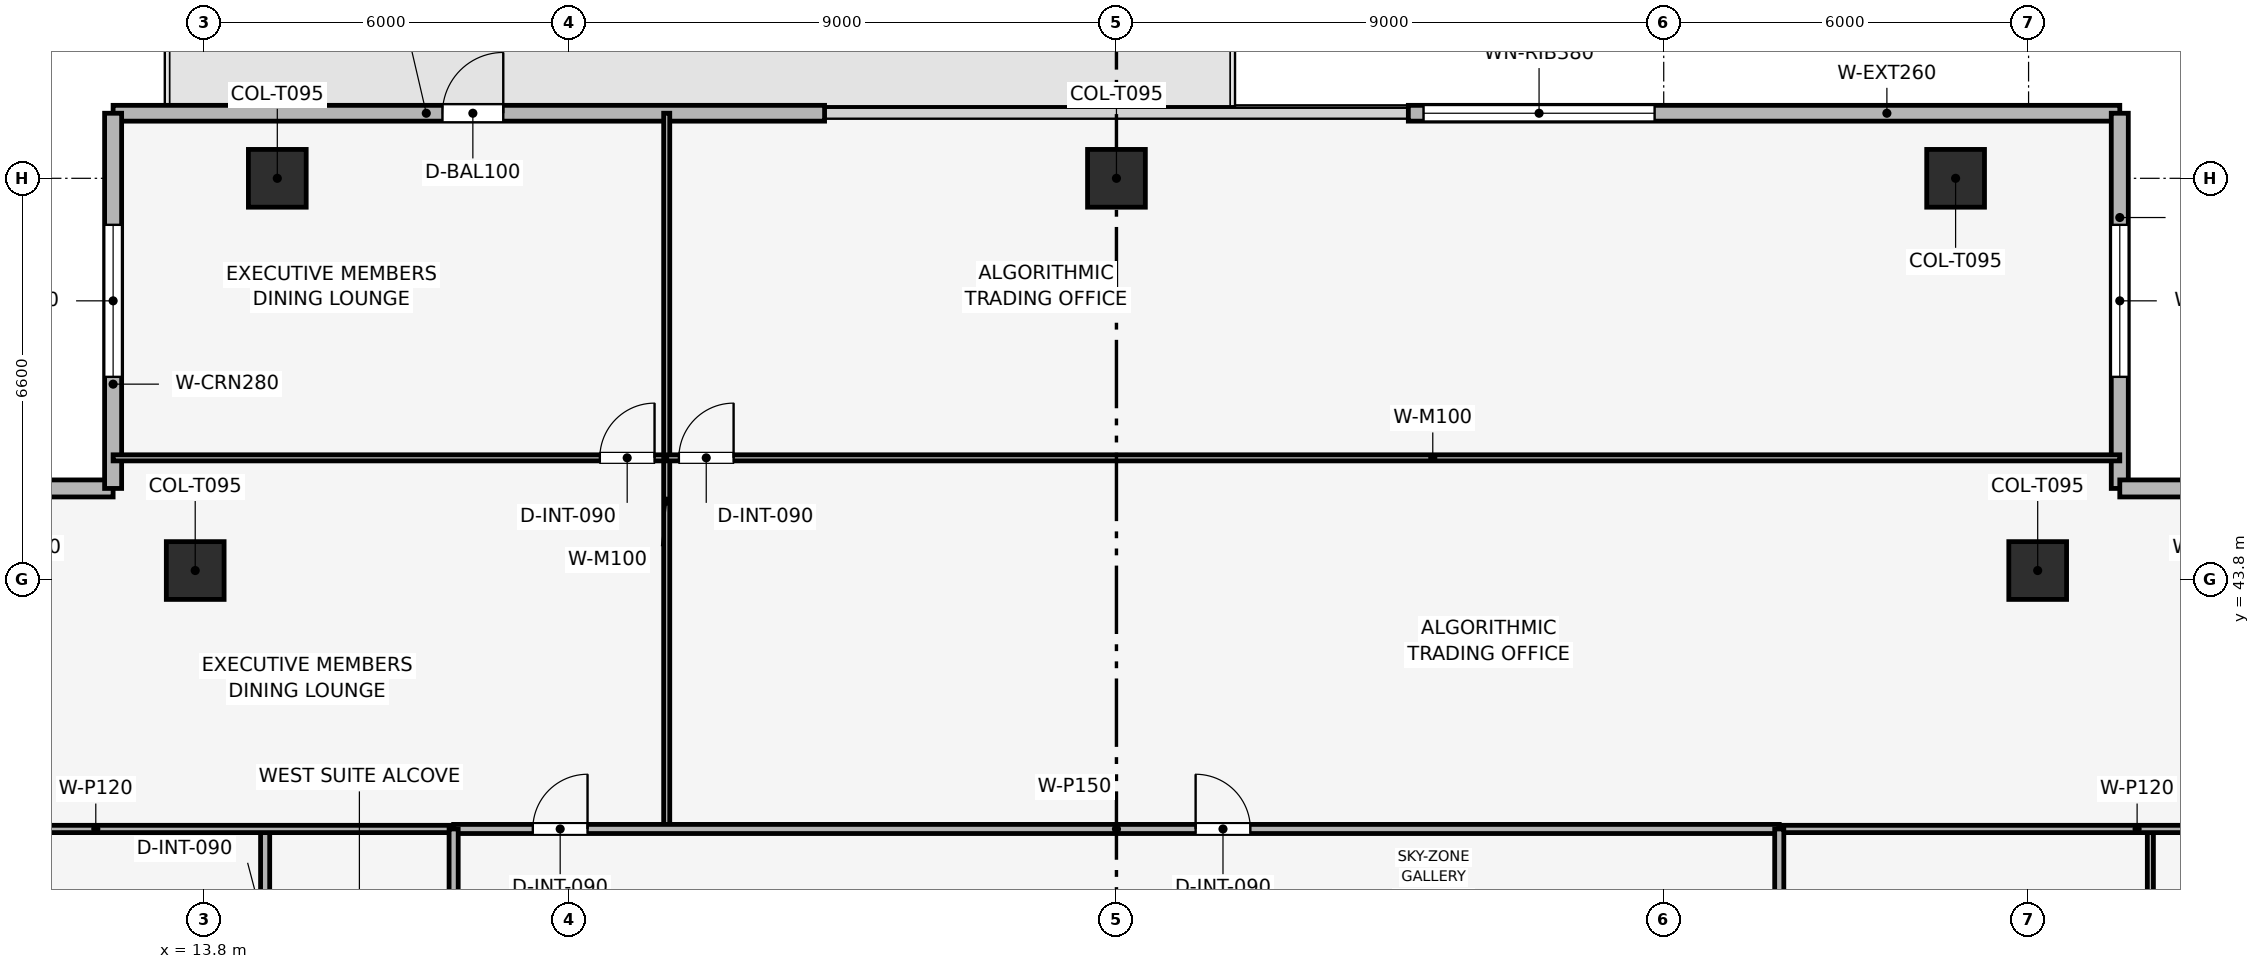
"""IFC4 building model, lengths in metres.
Left out: names, types, materials, properties, quantities, classifications, styles, units other than length and angle.
Written with IfcOpenShell. Run it as: python <this file> out.ifc"""

import sys

from ifc_helpers import new_model, si_unit, direction, frame, frame_2d, origin, origin_2d, place, context, subcontext, project, spatial, rectangle, extrude, element, fill, save


model = new_model("IFC4")
c1 = context("Model", 3, precision=1e-05, world=origin(), true_north=direction((0.0, 1.0)))
c2 = subcontext(c1, "Body", "Model", "MODEL_VIEW")
j1 = project(units=[si_unit("LENGTHUNIT", "METRE"), si_unit("PLANEANGLEUNIT", "RADIAN")], contexts=[c1])
p1 = place(None, origin())
s1 = spatial("IfcSite", under=j1, at=p1, CompositionType="ELEMENT")
p2 = place(p1, origin())
s2 = spatial("IfcBuilding", under=s1, at=p2, CompositionType="ELEMENT")
p3 = place(p2, frame((0.0, 0.0, 306.75)))
s3 = spatial("IfcBuildingStorey", under=s2, at=p3, CompositionType="ELEMENT", Elevation=306.75)
for number, where, z_axis, x_axis in (
    (1, (42.6, 50.4, 0.003), (0.0, 0.0, 1.0), (1.0, 0.0, 0.0)),
    (2, (28.8, 50.4, 0.003), (0.0, 0.0, 1.0), (1.0, 0.0, 0.0)),
    (3, (15.0, 50.4, 0.003), (0.0, 0.0, 1.0), (1.0, 0.0, 0.0)),
    (4, (43.95, 43.95, 0.003), (0.0, 0.0, 1.0), (1.0, 0.0, 0.0)),
    (5, (13.65, 43.95, 0.003), (0.0, 0.0, 1.0), (1.0, 0.0, 0.0)),
):
    element("IfcColumn", number, at=place(p3, frame(where, z_axis=z_axis, x_axis=x_axis)), inside=s3, PredefinedType="COLUMN", context=c2, shape_type="SweptSolid", body=[
        extrude(rectangle(XDim=0.95, YDim=0.95, at=origin_2d()), origin(), (0.0, 0.0, 1.0), 3.504),
    ])
p4 = place(p3, frame((12.3, 51.47, 0.0), z_axis=(0.0, 0.0, 1.0), x_axis=(1.0, 0.0, 0.0)))
e6 = element("IfcWall", 6, at=p4, inside=s3, PredefinedType="SOLIDWALL", context=c2, shape_type="SweptSolid", body=[
    extrude(rectangle(XDim=11.7, YDim=0.26, at=frame_2d((5.85, 0.0))), origin(), (0.0, 0.0, 1.0), 3.51),
])
p5 = place(p4, frame((5.416, 0.0, 0.0)))
e7 = element("IfcOpeningElement", 7, at=p5, cuts=e6, PredefinedType="OPENING", context=c2, shape_type="SweptSolid", body=[
    extrude(rectangle(XDim=1.0, YDim=2.2, at=frame_2d((0.5, 1.1))), frame((0.0, 0.14, 0.0), z_axis=(0.0, -1.0, 0.0), x_axis=(1.0, 0.0, 0.0)), (0.0, 0.0, 1.0), 0.28),
])
p6 = place(p3, frame((33.6, 51.47, 0.0), z_axis=(0.0, 0.0, 1.0), x_axis=(1.0, 0.0, 0.0)))
e8 = element("IfcWall", 8, at=p6, inside=s3, PredefinedType="SOLIDWALL", context=c2, shape_type="SweptSolid", body=[
    extrude(rectangle(XDim=11.7, YDim=0.26, at=frame_2d((5.85, 0.0))), origin(), (0.0, 0.0, 1.0), 3.51),
])
p7 = place(p6, frame((0.25, 0.0, 0.9)))
e9 = element("IfcOpeningElement", 9, at=p7, cuts=e8, PredefinedType="OPENING", context=c2, shape_type="SweptSolid", body=[
    extrude(rectangle(XDim=3.8, YDim=1.9, at=frame_2d((1.9, 0.95))), frame((0.0, 0.14, 0.0), z_axis=(0.0, -1.0, 0.0), x_axis=(1.0, 0.0, 0.0)), (0.0, 0.0, 1.0), 0.28),
])
p8 = place(p3, frame((6.13, 45.3, 0.0), z_axis=(0.0, 0.0, 1.0), x_axis=(1.0, 0.0, 0.0)))
e10 = element("IfcWall", 10, at=p8, inside=s3, PredefinedType="SOLIDWALL", context=c2, shape_type="SweptSolid", body=[
    extrude(rectangle(XDim=6.17, YDim=0.28, at=frame_2d((3.085, 0.0))), origin(), (0.0, 0.0, 1.0), 3.51),
])
p9 = place(p8, frame((1.835, 0.0, 0.9)))
e11 = element("IfcOpeningElement", 11, at=p9, cuts=e10, PredefinedType="OPENING", context=c2, shape_type="SweptSolid", body=[
    extrude(rectangle(XDim=2.5, YDim=1.9, at=frame_2d((1.25, 0.95))), frame((0.0, 0.15, 0.0), z_axis=(0.0, -1.0, 0.0), x_axis=(1.0, 0.0, 0.0)), (0.0, 0.0, 1.0), 0.3),
])
p10 = place(p3, frame((12.3, 45.3, 0.0), z_axis=(0.0, 0.0, 1.0), x_axis=(0.0, 1.0, 0.0)))
e12 = element("IfcWall", 12, at=p10, inside=s3, PredefinedType="SOLIDWALL", context=c2, shape_type="SweptSolid", body=[
    extrude(rectangle(XDim=6.17, YDim=0.28, at=frame_2d((3.085, 0.0))), origin(), (0.0, 0.0, 1.0), 3.51),
])
p11 = place(p10, frame((1.835, 0.0, 0.9)))
e13 = element("IfcOpeningElement", 13, at=p11, cuts=e12, PredefinedType="OPENING", context=c2, shape_type="SweptSolid", body=[
    extrude(rectangle(XDim=2.5, YDim=1.9, at=frame_2d((1.25, 0.95))), frame((0.0, 0.15, 0.0), z_axis=(0.0, -1.0, 0.0), x_axis=(1.0, 0.0, 0.0)), (0.0, 0.0, 1.0), 0.3),
])
p12 = place(p3, frame((45.3, 51.47, 0.0), z_axis=(0.0, 0.0, 1.0), x_axis=(0.0, -1.0, 0.0)))
e14 = element("IfcWall", 14, at=p12, inside=s3, PredefinedType="SOLIDWALL", context=c2, shape_type="SweptSolid", body=[
    extrude(rectangle(XDim=6.17, YDim=0.28, at=frame_2d((3.085, 0.0))), origin(), (0.0, 0.0, 1.0), 3.51),
])
p13 = place(p12, frame((1.835, 0.0, 0.9)))
e15 = element("IfcOpeningElement", 15, at=p13, cuts=e14, PredefinedType="OPENING", context=c2, shape_type="SweptSolid", body=[
    extrude(rectangle(XDim=2.5, YDim=1.9, at=frame_2d((1.25, 0.95))), frame((0.0, 0.15, 0.0), z_axis=(0.0, -1.0, 0.0), x_axis=(1.0, 0.0, 0.0)), (0.0, 0.0, 1.0), 0.3),
])
p14 = place(p3, frame((45.3, 45.3, 0.0), z_axis=(0.0, 0.0, 1.0), x_axis=(1.0, 0.0, 0.0)))
e16 = element("IfcWall", 16, at=p14, inside=s3, PredefinedType="SOLIDWALL", context=c2, shape_type="SweptSolid", body=[
    extrude(rectangle(XDim=6.17, YDim=0.28, at=frame_2d((3.085, 0.0))), origin(), (0.0, 0.0, 1.0), 3.51),
])
p15 = place(p14, frame((1.835, 0.0, 0.9)))
e17 = element("IfcOpeningElement", 17, at=p15, cuts=e16, PredefinedType="OPENING", context=c2, shape_type="SweptSolid", body=[
    extrude(rectangle(XDim=2.5, YDim=1.9, at=frame_2d((1.25, 0.95))), frame((0.0, 0.15, 0.0), z_axis=(0.0, -1.0, 0.0), x_axis=(1.0, 0.0, 0.0)), (0.0, 0.0, 1.0), 0.3),
])
p16 = place(p3, frame((12.3, 45.803, 0.0), z_axis=(0.0, 0.0, 1.0), x_axis=(1.0, 0.0, 0.0)))
e18 = element("IfcWall", 18, at=p16, inside=s3, PredefinedType="MOVABLE", context=c2, shape_type="SweptSolid", body=[
    extrude(rectangle(XDim=9.104, YDim=0.1, at=frame_2d((4.552, 0.0))), origin(), (0.0, 0.0, 1.0), 3.095),
])
p17 = place(p16, frame((8.004, 0.0, 0.0)))
e19 = element("IfcOpeningElement", 19, at=p17, cuts=e18, PredefinedType="OPENING", context=c2, shape_type="SweptSolid", body=[
    extrude(rectangle(XDim=0.9, YDim=2.1, at=frame_2d((0.45, 1.05))), frame((0.0, 0.06, 0.0), z_axis=(0.0, -1.0, 0.0), x_axis=(1.0, 0.0, 0.0)), (0.0, 0.0, 1.0), 0.12),
])
p18 = place(p3, frame((21.404, 39.7, 0.0), z_axis=(0.0, 0.0, 1.0), x_axis=(0.0, 1.0, 0.0)))
e20 = element("IfcWall", 20, at=p18, inside=s3, PredefinedType="MOVABLE", context=c2, shape_type="SweptSolid", body=[
    extrude(rectangle(XDim=11.77, YDim=0.1, at=frame_2d((5.885, 0.0))), origin(), (0.0, 0.0, 1.0), 3.135),
])
p19 = place(p3, frame((21.404, 45.803, 0.0), z_axis=(0.0, 0.0, 1.0), x_axis=(1.0, 0.0, 0.0)))
e21 = element("IfcWall", 21, at=p19, inside=s3, PredefinedType="MOVABLE", context=c2, shape_type="SweptSolid", body=[
    extrude(rectangle(XDim=23.896, YDim=0.1, at=frame_2d((11.948, 0.0))), origin(), (0.0, 0.0, 1.0), 3.095),
])
p20 = place(p19, frame((0.2, 0.0, 0.0)))
e22 = element("IfcOpeningElement", 22, at=p20, cuts=e21, PredefinedType="OPENING", context=c2, shape_type="SweptSolid", body=[
    extrude(rectangle(XDim=0.9, YDim=2.1, at=frame_2d((0.45, 1.05))), frame((0.0, 0.06, 0.0), z_axis=(0.0, -1.0, 0.0), x_axis=(1.0, 0.0, 0.0)), (0.0, 0.0, 1.0), 0.12),
])
p21 = place(p3, frame((14.8, 28.0, 0.0), z_axis=(0.0, 0.0, 1.0), x_axis=(0.0, 1.0, 0.0)))
e23 = element("IfcWall", 23, at=p21, inside=s3, PredefinedType="PARTITIONING", context=c2, shape_type="SweptSolid", body=[
    extrude(rectangle(XDim=11.7, YDim=0.15, at=frame_2d((5.85, 0.0))), origin(), (0.0, 0.0, 1.0), 3.095),
])
p22 = place(p21, frame((9.6, 0.0, 0.0)))
e24 = element("IfcOpeningElement", 24, at=p22, cuts=e23, PredefinedType="OPENING", context=c2, shape_type="SweptSolid", body=[
    extrude(rectangle(XDim=0.9, YDim=2.1, at=frame_2d((0.45, 1.05))), frame((0.0, 0.085, 0.0), z_axis=(0.0, -1.0, 0.0), x_axis=(1.0, 0.0, 0.0)), (0.0, 0.0, 1.0), 0.17),
])
p23 = place(p3, frame((45.803, 29.428, 0.0), z_axis=(0.0, 0.0, 1.0), x_axis=(0.0, 1.0, 0.0)))
e25 = element("IfcWall", 25, at=p23, inside=s3, PredefinedType="MOVABLE", context=c2, shape_type="SweptSolid", body=[
    extrude(rectangle(XDim=10.272, YDim=0.1, at=frame_2d((5.136, 0.0))), origin(), (0.0, 0.0, 1.0), 3.095),
])
p24 = place(p23, frame((5.808, 0.0, 0.0)))
e26 = element("IfcOpeningElement", 26, at=p24, cuts=e25, PredefinedType="OPENING", context=c2, shape_type="SweptSolid", body=[
    extrude(rectangle(XDim=0.9, YDim=2.1, at=frame_2d((0.45, 1.05))), frame((0.0, 0.06, 0.0), z_axis=(0.0, -1.0, 0.0), x_axis=(1.0, 0.0, 0.0)), (0.0, 0.0, 1.0), 0.12),
])
for number, where, z_axis, x_axis in (
    (27, (6.13, 39.7, 0.0), (0.0, 0.0, 1.0), (1.0, 0.0, 0.0)),
    (28, (39.7, 39.7, 0.0), (0.0, 0.0, 1.0), (1.0, 0.0, 0.0)),
):
    element("IfcWall", number, at=place(p3, frame(where, z_axis=z_axis, x_axis=x_axis)), inside=s3, PredefinedType="PARTITIONING", context=c2, shape_type="SweptSolid", body=[
        extrude(rectangle(XDim=11.77, YDim=0.12, at=frame_2d((5.885, 0.0))), origin(), (0.0, 0.0, 1.0), 3.095),
    ])
p25 = place(p3, frame((17.9, 39.7, 0.0), z_axis=(0.0, 0.0, 1.0), x_axis=(1.0, 0.0, 0.0)))
e29 = element("IfcWall", 29, at=p25, inside=s3, PredefinedType="PARTITIONING", context=c2, shape_type="SweptSolid", body=[
    extrude(rectangle(XDim=21.8, YDim=0.15, at=frame_2d((10.9, 0.0))), origin(), (0.0, 0.0, 1.0), 3.095),
])
p26 = place(p25, frame((1.302, 0.0, 0.0)))
e30 = element("IfcOpeningElement", 30, at=p26, cuts=e29, PredefinedType="OPENING", context=c2, shape_type="SweptSolid", body=[
    extrude(rectangle(XDim=0.9, YDim=2.1, at=frame_2d((0.45, 1.05))), frame((0.0, 0.085, 0.0), z_axis=(0.0, -1.0, 0.0), x_axis=(1.0, 0.0, 0.0)), (0.0, 0.0, 1.0), 0.17),
])
p27 = place(p25, frame((12.202, 0.0, 0.0)))
e31 = element("IfcOpeningElement", 31, at=p27, cuts=e29, PredefinedType="OPENING", context=c2, shape_type="SweptSolid", body=[
    extrude(rectangle(XDim=0.9, YDim=2.1, at=frame_2d((0.45, 1.05))), frame((0.0, 0.085, 0.0), z_axis=(0.0, -1.0, 0.0), x_axis=(1.0, 0.0, 0.0)), (0.0, 0.0, 1.0), 0.17),
])
p28 = place(p3, frame((17.9, 12.3, 0.0), z_axis=(0.0, 0.0, 1.0), x_axis=(0.0, 1.0, 0.0)))
e32 = element("IfcWall", 32, at=p28, inside=s3, PredefinedType="PARTITIONING", context=c2, shape_type="SweptSolid", body=[
    extrude(rectangle(XDim=27.4, YDim=0.15, at=frame_2d((13.7, 0.0))), origin(), (0.0, 0.0, 1.0), 3.095),
])
p29 = place(p28, frame((0.7, 0.0, 0.0)))
e33 = element("IfcOpeningElement", 33, at=p29, cuts=e32, PredefinedType="OPENING", context=c2, shape_type="SweptSolid", body=[
    extrude(rectangle(XDim=0.9, YDim=2.1, at=frame_2d((0.45, 1.05))), frame((0.0, 0.085, 0.0), z_axis=(0.0, -1.0, 0.0), x_axis=(1.0, 0.0, 0.0)), (0.0, 0.0, 1.0), 0.17),
])
p30 = place(p28, frame((4.534, 0.0, 0.0)))
e34 = element("IfcOpeningElement", 34, at=p30, cuts=e32, PredefinedType="OPENING", context=c2, shape_type="SweptSolid", body=[
    extrude(rectangle(XDim=0.9, YDim=2.1, at=frame_2d((0.45, 1.05))), frame((0.0, 0.085, 0.0), z_axis=(0.0, -1.0, 0.0), x_axis=(1.0, 0.0, 0.0)), (0.0, 0.0, 1.0), 0.17),
])
p31 = place(p28, frame((11.234, 0.0, 0.0)))
e35 = element("IfcOpeningElement", 35, at=p31, cuts=e32, PredefinedType="OPENING", context=c2, shape_type="SweptSolid", body=[
    extrude(rectangle(XDim=0.9, YDim=2.1, at=frame_2d((0.45, 1.05))), frame((0.0, 0.085, 0.0), z_axis=(0.0, -1.0, 0.0), x_axis=(1.0, 0.0, 0.0)), (0.0, 0.0, 1.0), 0.17),
])
p32 = place(p28, frame((16.65, 0.0, 0.0)))
e36 = element("IfcOpeningElement", 36, at=p32, cuts=e32, PredefinedType="OPENING", context=c2, shape_type="SweptSolid", body=[
    extrude(rectangle(XDim=0.9, YDim=2.1, at=frame_2d((0.45, 1.05))), frame((0.0, 0.085, 0.0), z_axis=(0.0, -1.0, 0.0), x_axis=(1.0, 0.0, 0.0)), (0.0, 0.0, 1.0), 0.17),
])
p33 = place(p28, frame((19.55, 0.0, 0.0)))
e37 = element("IfcOpeningElement", 37, at=p33, cuts=e32, PredefinedType="OPENING", context=c2, shape_type="SweptSolid", body=[
    extrude(rectangle(XDim=0.9, YDim=2.1, at=frame_2d((0.45, 1.05))), frame((0.0, 0.085, 0.0), z_axis=(0.0, -1.0, 0.0), x_axis=(1.0, 0.0, 0.0)), (0.0, 0.0, 1.0), 0.17),
])
p34 = place(p28, frame((22.3, 0.0, 0.0)))
e38 = element("IfcOpeningElement", 38, at=p34, cuts=e32, PredefinedType="OPENING", context=c2, shape_type="SweptSolid", body=[
    extrude(rectangle(XDim=0.95, YDim=2.1, at=frame_2d((0.475, 1.05))), frame((0.0, 0.085, 0.0), z_axis=(0.0, -1.0, 0.0), x_axis=(1.0, 0.0, 0.0)), (0.0, 0.0, 1.0), 0.17),
])
p35 = place(p28, frame((25.3, 0.0, 0.0)))
e39 = element("IfcOpeningElement", 39, at=p35, cuts=e32, PredefinedType="OPENING", context=c2, shape_type="SweptSolid", body=[
    extrude(rectangle(XDim=0.9, YDim=2.1, at=frame_2d((0.45, 1.05))), frame((0.0, 0.085, 0.0), z_axis=(0.0, -1.0, 0.0), x_axis=(1.0, 0.0, 0.0)), (0.0, 0.0, 1.0), 0.17),
])
p36 = place(p3, frame((39.7, 24.4, 0.0), z_axis=(0.0, 0.0, 1.0), x_axis=(0.0, 1.0, 0.0)))
e40 = element("IfcWall", 40, at=p36, inside=s3, PredefinedType="PARTITIONING", context=c2, shape_type="SweptSolid", body=[
    extrude(rectangle(XDim=15.3, YDim=0.15, at=frame_2d((7.65, 0.0))), origin(), (0.0, 0.0, 1.0), 3.095),
])
p37 = place(p36, frame((2.064, 0.0, 0.0)))
e41 = element("IfcOpeningElement", 41, at=p37, cuts=e40, PredefinedType="OPENING", context=c2, shape_type="SweptSolid", body=[
    extrude(rectangle(XDim=0.9, YDim=2.1, at=frame_2d((0.45, 1.05))), frame((0.0, 0.085, 0.0), z_axis=(0.0, -1.0, 0.0), x_axis=(1.0, 0.0, 0.0)), (0.0, 0.0, 1.0), 0.17),
])
p38 = place(p36, frame((9.714, 0.0, 0.0)))
e42 = element("IfcOpeningElement", 42, at=p38, cuts=e40, PredefinedType="OPENING", context=c2, shape_type="SweptSolid", body=[
    extrude(rectangle(XDim=0.9, YDim=2.1, at=frame_2d((0.45, 1.05))), frame((0.0, 0.085, 0.0), z_axis=(0.0, -1.0, 0.0), x_axis=(1.0, 0.0, 0.0)), (0.0, 0.0, 1.0), 0.17),
])
p39 = place(p5, origin())
e43 = element("IfcDoor", 43, at=p39, inside=s3, OperationType="SINGLE_SWING_RIGHT", PredefinedType="DOOR", context=c2, shape_type="SweptSolid", body=[
    extrude(rectangle(XDim=1.0, YDim=2.2, at=frame_2d((0.5, 1.1))), frame((0.0, 0.025, 0.0), z_axis=(0.0, -1.0, 0.0), x_axis=(1.0, 0.0, 0.0)), (0.0, 0.0, 1.0), 0.05),
])
fill(e7, e43)
p40 = place(p7, origin())
e44 = element("IfcWindow", 44, at=p40, inside=s3, PartitioningType="SINGLE_PANEL", PredefinedType="WINDOW", context=c2, shape_type="SweptSolid", body=[
    extrude(rectangle(XDim=3.8, YDim=1.9, at=frame_2d((1.9, 0.95))), frame((0.0, 0.03, 0.0), z_axis=(0.0, -1.0, 0.0), x_axis=(1.0, 0.0, 0.0)), (0.0, 0.0, 1.0), 0.06),
])
fill(e9, e44)
p41 = place(p11, origin())
e45 = element("IfcWindow", 45, at=p41, inside=s3, PartitioningType="SINGLE_PANEL", PredefinedType="WINDOW", context=c2, shape_type="SweptSolid", body=[
    extrude(rectangle(XDim=2.5, YDim=1.9, at=frame_2d((1.25, 0.95))), frame((0.0, 0.03, 0.0), z_axis=(0.0, -1.0, 0.0), x_axis=(1.0, 0.0, 0.0)), (0.0, 0.0, 1.0), 0.06),
])
fill(e13, e45)
p42 = place(p13, origin())
e46 = element("IfcWindow", 46, at=p42, inside=s3, PartitioningType="SINGLE_PANEL", PredefinedType="WINDOW", context=c2, shape_type="SweptSolid", body=[
    extrude(rectangle(XDim=2.5, YDim=1.9, at=frame_2d((1.25, 0.95))), frame((0.0, 0.03, 0.0), z_axis=(0.0, -1.0, 0.0), x_axis=(1.0, 0.0, 0.0)), (0.0, 0.0, 1.0), 0.06),
])
fill(e15, e46)
p43 = place(p17, origin())
e47 = element("IfcDoor", 47, at=p43, inside=s3, OperationType="SINGLE_SWING_RIGHT", PredefinedType="DOOR", context=c2, shape_type="SweptSolid", body=[
    extrude(rectangle(XDim=0.9, YDim=2.1, at=frame_2d((0.45, 1.05))), frame((0.0, 0.025, 0.0), z_axis=(0.0, -1.0, 0.0), x_axis=(1.0, 0.0, 0.0)), (0.0, 0.0, 1.0), 0.05),
])
fill(e19, e47)
p44 = place(p20, origin())
e48 = element("IfcDoor", 48, at=p44, inside=s3, OperationType="SINGLE_SWING_RIGHT", PredefinedType="DOOR", context=c2, shape_type="SweptSolid", body=[
    extrude(rectangle(XDim=0.9, YDim=2.1, at=frame_2d((0.45, 1.05))), frame((0.0, 0.025, 0.0), z_axis=(0.0, -1.0, 0.0), x_axis=(1.0, 0.0, 0.0)), (0.0, 0.0, 1.0), 0.05),
])
fill(e22, e48)
p45 = place(p26, origin())
e49 = element("IfcDoor", 49, at=p45, inside=s3, OperationType="SINGLE_SWING_RIGHT", PredefinedType="DOOR", context=c2, shape_type="SweptSolid", body=[
    extrude(rectangle(XDim=0.9, YDim=2.1, at=frame_2d((0.45, 1.05))), frame((0.0, 0.025, 0.0), z_axis=(0.0, -1.0, 0.0), x_axis=(1.0, 0.0, 0.0)), (0.0, 0.0, 1.0), 0.05),
])
fill(e30, e49)
p46 = place(p27, origin())
e50 = element("IfcDoor", 50, at=p46, inside=s3, OperationType="SINGLE_SWING_LEFT", PredefinedType="DOOR", context=c2, shape_type="SweptSolid", body=[
    extrude(rectangle(XDim=0.9, YDim=2.1, at=frame_2d((0.45, 1.05))), frame((0.0, 0.025, 0.0), z_axis=(0.0, -1.0, 0.0), x_axis=(1.0, 0.0, 0.0)), (0.0, 0.0, 1.0), 0.05),
])
fill(e31, e50)
save(model, sys.argv[1])
